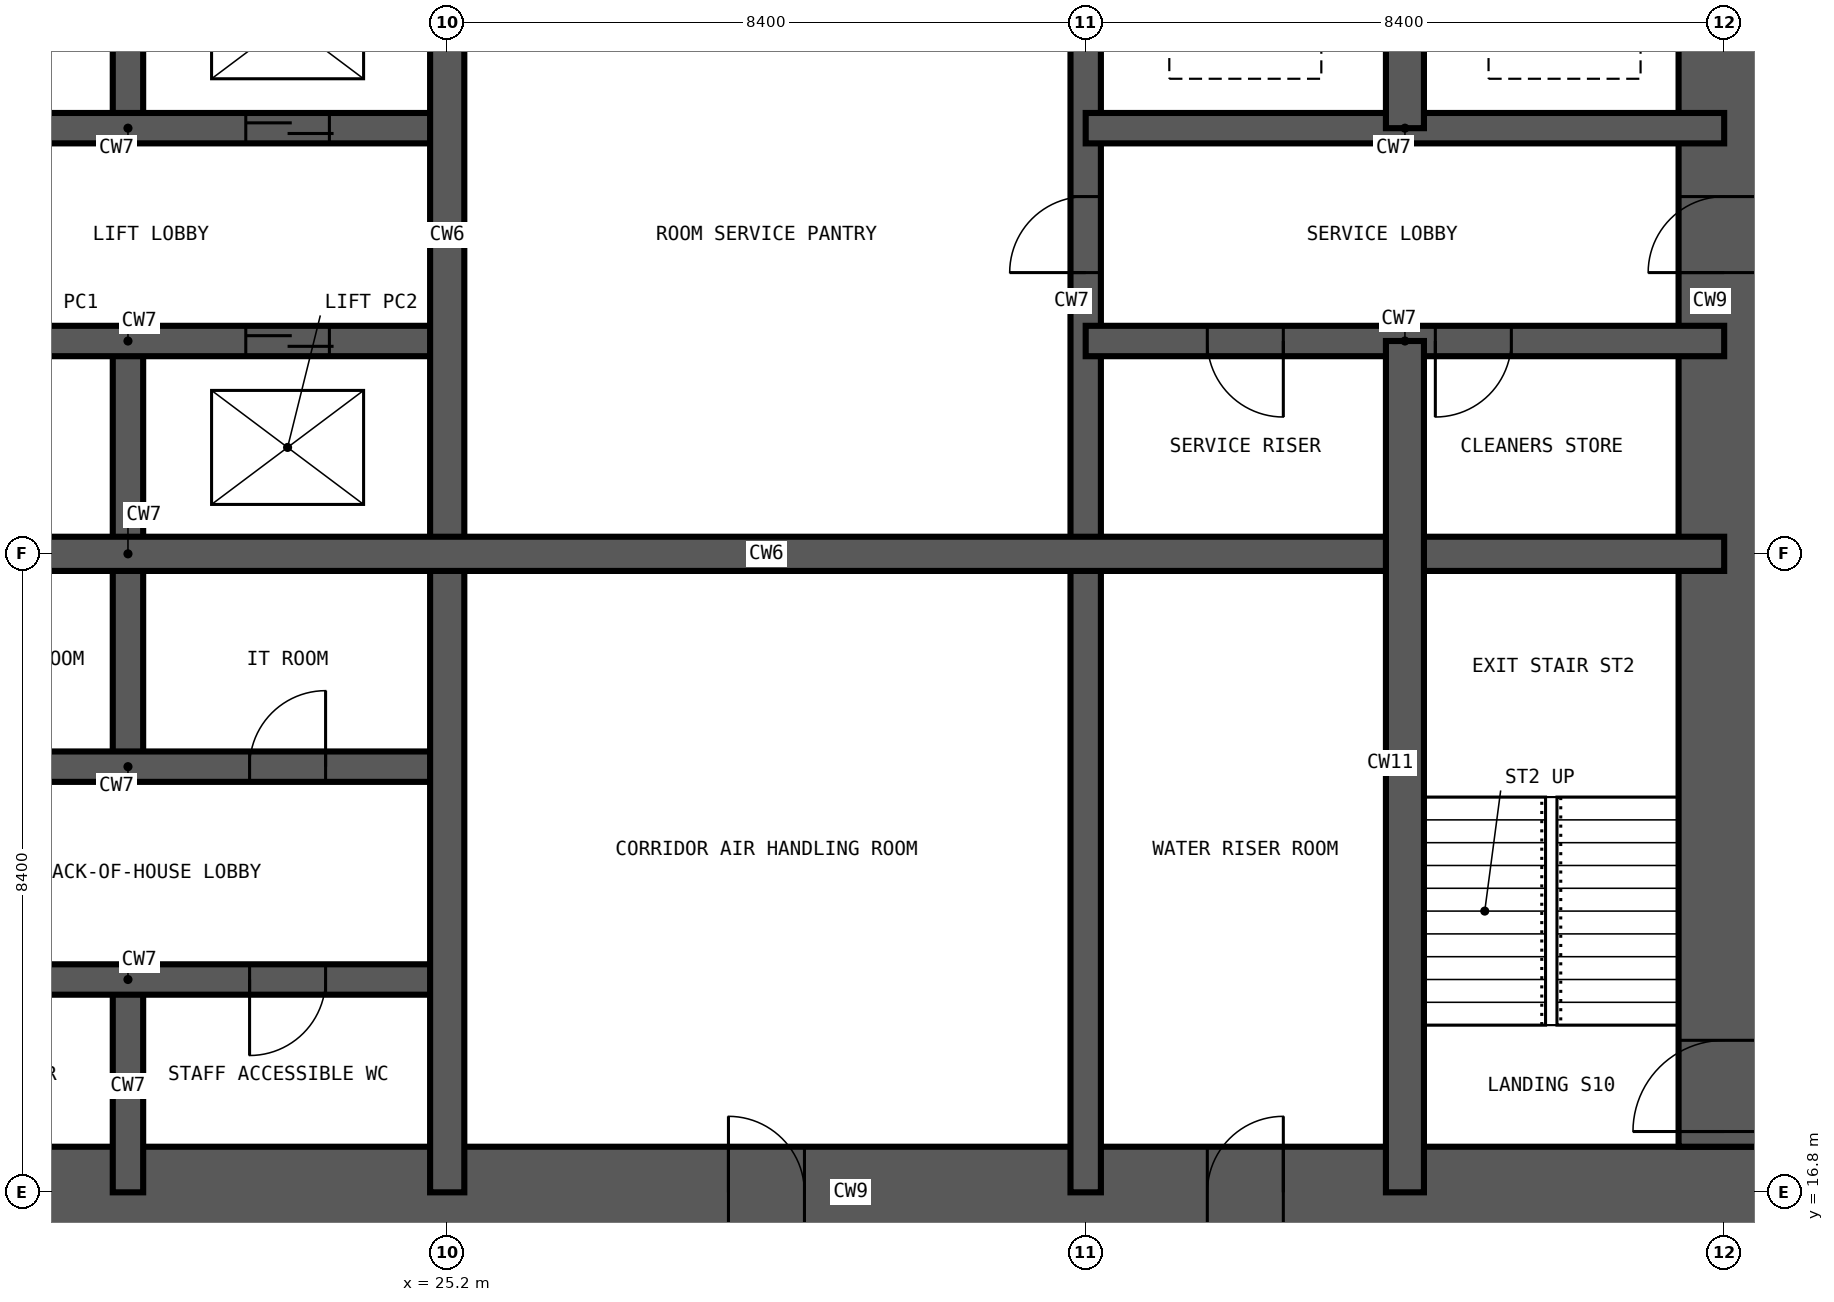
"""IFC4 building model, lengths in metres.
Left out: names, types, materials, properties, quantities, classifications, styles, units other than length and angle.
Written with IfcOpenShell. Run it as: python <this file> out.ifc"""

import sys

from ifc_helpers import new_model, si_unit, direction, frame, frame_2d, origin, place, context, subcontext, project, spatial, rectangle, extrude, element, fill, save


model = new_model("IFC4")
c1 = context("Model", 3, precision=1e-05, world=origin(), true_north=direction((0.0, 1.0)))
c2 = subcontext(c1, "Body", "Model", "MODEL_VIEW")
j1 = project(units=[si_unit("LENGTHUNIT", "METRE"), si_unit("PLANEANGLEUNIT", "RADIAN")], contexts=[c1])
p1 = place(None, origin())
s1 = spatial("IfcSite", under=j1, at=p1, CompositionType="ELEMENT")
p2 = place(p1, origin())
s2 = spatial("IfcBuilding", under=s1, at=p2, CompositionType="ELEMENT")
p3 = place(p2, frame((0.0, 0.0, 216.6)))
s3 = spatial("IfcBuildingStorey", under=s2, at=p3, CompositionType="ELEMENT", Elevation=216.6)
p4 = place(p3, frame((16.2, 16.8, -0.35), z_axis=(0.0, 0.0, 1.0), x_axis=(1.0, 0.0, 0.0)))
e1 = element("IfcWall", 1, at=p4, inside=s3, PredefinedType="SHEAR", context=c2, shape_type="SweptSolid", body=[
    extrude(rectangle(XDim=26.4, YDim=1.2, at=frame_2d((13.2, 0.0))), origin(), (0.0, 0.0, 1.0), 3.55),
])
p5 = place(p4, frame((12.7, 0.0, 0.35)))
e2 = element("IfcOpeningElement", 2, at=p5, cuts=e1, PredefinedType="OPENING", context=c2, shape_type="SweptSolid", body=[
    extrude(rectangle(XDim=1.0, YDim=2.1, at=frame_2d((0.5, 1.05))), frame((0.0, 0.61, 0.0), z_axis=(0.0, -1.0, 0.0), x_axis=(1.0, 0.0, 0.0)), (0.0, 0.0, 1.0), 1.22),
])
p6 = place(p4, frame((19.0, 0.0, 0.35)))
e3 = element("IfcOpeningElement", 3, at=p6, cuts=e1, PredefinedType="OPENING", context=c2, shape_type="SweptSolid", body=[
    extrude(rectangle(XDim=1.0, YDim=2.1, at=frame_2d((0.5, 1.05))), frame((0.0, 0.61, 0.0), z_axis=(0.0, -1.0, 0.0), x_axis=(1.0, 0.0, 0.0)), (0.0, 0.0, 1.0), 1.22),
])
p7 = place(p3, frame((42.0, 17.4, -0.35), z_axis=(0.0, 0.0, 1.0), x_axis=(0.0, 1.0, 0.0)))
e4 = element("IfcWall", 4, at=p7, inside=s3, PredefinedType="SHEAR", context=c2, shape_type="SweptSolid", body=[
    extrude(rectangle(XDim=24.0, YDim=1.2, at=frame_2d((12.0, 0.0))), origin(), (0.0, 0.0, 1.0), 3.55),
])
p8 = place(p7, frame((0.2, 0.0, 0.35)))
e5 = element("IfcOpeningElement", 5, at=p8, cuts=e4, PredefinedType="OPENING", context=c2, shape_type="SweptSolid", body=[
    extrude(rectangle(XDim=1.2, YDim=2.2, at=frame_2d((0.6, 1.1))), frame((0.0, 0.61, 0.0), z_axis=(0.0, -1.0, 0.0), x_axis=(1.0, 0.0, 0.0)), (0.0, 0.0, 1.0), 1.22),
])
p9 = place(p7, frame((11.5, 0.0, 0.35)))
e6 = element("IfcOpeningElement", 6, at=p9, cuts=e4, PredefinedType="OPENING", context=c2, shape_type="SweptSolid", body=[
    extrude(rectangle(XDim=1.0, YDim=2.1, at=frame_2d((0.5, 1.05))), frame((0.0, 0.61, 0.0), z_axis=(0.0, -1.0, 0.0), x_axis=(1.0, 0.0, 0.0)), (0.0, 0.0, 1.0), 1.22),
])
p10 = place(p7, frame((19.9, 0.0, 0.35)))
e7 = element("IfcOpeningElement", 7, at=p10, cuts=e4, PredefinedType="OPENING", context=c2, shape_type="SweptSolid", body=[
    extrude(rectangle(XDim=1.0, YDim=2.1, at=frame_2d((0.5, 1.05))), frame((0.0, 0.61, 0.0), z_axis=(0.0, -1.0, 0.0), x_axis=(1.0, 0.0, 0.0)), (0.0, 0.0, 1.0), 1.22),
])
p11 = place(p3, frame((21.0, 16.8, -0.35), z_axis=(0.0, 0.0, 1.0), x_axis=(0.0, 1.0, 0.0)))
e8 = element("IfcWall", 8, at=p11, inside=s3, PredefinedType="SHEAR", context=c2, shape_type="SweptSolid", body=[
    extrude(rectangle(XDim=2.8, YDim=0.4, at=frame_2d((1.4, 0.0))), origin(), (0.0, 0.0, 1.0), 3.55),
])
p12 = place(p3, frame((21.0, 22.4, -0.35), z_axis=(0.0, 0.0, 1.0), x_axis=(0.0, 1.0, 0.0)))
e9 = element("IfcWall", 9, at=p12, inside=s3, PredefinedType="SHEAR", context=c2, shape_type="SweptSolid", body=[
    extrude(rectangle(XDim=5.6, YDim=0.4, at=frame_2d((2.8, 0.0))), origin(), (0.0, 0.0, 1.0), 3.55),
])
p13 = place(p3, frame((21.0, 30.8, -0.35), z_axis=(0.0, 0.0, 1.0), x_axis=(0.0, 1.0, 0.0)))
e10 = element("IfcWall", 10, at=p13, inside=s3, PredefinedType="SHEAR", context=c2, shape_type="SweptSolid", body=[
    extrude(rectangle(XDim=2.8, YDim=0.4, at=frame_2d((1.4, 0.0))), origin(), (0.0, 0.0, 1.0), 3.55),
])
p14 = place(p3, frame((33.6, 16.8, -0.35), z_axis=(0.0, 0.0, 1.0), x_axis=(0.0, 1.0, 0.0)))
e11 = element("IfcWall", 11, at=p14, inside=s3, PredefinedType="SHEAR", context=c2, shape_type="SweptSolid", body=[
    extrude(rectangle(XDim=25.2, YDim=0.4, at=frame_2d((12.6, 0.0))), origin(), (0.0, 0.0, 1.0), 3.55),
])
p15 = place(p14, frame((22.5, 0.0, 0.35)))
e12 = element("IfcOpeningElement", 12, at=p15, cuts=e11, PredefinedType="OPENING", context=c2, shape_type="SweptSolid", body=[
    extrude(rectangle(XDim=1.2, YDim=2.2, at=frame_2d((0.6, 1.1))), frame((0.0, 0.21, 0.0), z_axis=(0.0, -1.0, 0.0), x_axis=(1.0, 0.0, 0.0)), (0.0, 0.0, 1.0), 0.42),
])
p16 = place(p14, frame((18.3, 0.0, 0.35)))
e13 = element("IfcOpeningElement", 13, at=p16, cuts=e11, PredefinedType="OPENING", context=c2, shape_type="SweptSolid", body=[
    extrude(rectangle(XDim=1.2, YDim=2.2, at=frame_2d((0.6, 1.1))), frame((0.0, 0.21, 0.0), z_axis=(0.0, -1.0, 0.0), x_axis=(1.0, 0.0, 0.0)), (0.0, 0.0, 1.0), 0.42),
])
p17 = place(p14, frame((12.1, 0.0, 0.35)))
e14 = element("IfcOpeningElement", 14, at=p17, cuts=e11, PredefinedType="OPENING", context=c2, shape_type="SweptSolid", body=[
    extrude(rectangle(XDim=1.0, YDim=2.1, at=frame_2d((0.5, 1.05))), frame((0.0, 0.21, 0.0), z_axis=(0.0, -1.0, 0.0), x_axis=(1.0, 0.0, 0.0)), (0.0, 0.0, 1.0), 0.42),
])
p18 = place(p3, frame((16.8, 19.6, -0.35), z_axis=(0.0, 0.0, 1.0), x_axis=(1.0, 0.0, 0.0)))
e15 = element("IfcWall", 15, at=p18, inside=s3, PredefinedType="SHEAR", context=c2, shape_type="SweptSolid", body=[
    extrude(rectangle(XDim=8.4, YDim=0.4, at=frame_2d((4.2, 0.0))), origin(), (0.0, 0.0, 1.0), 3.55),
])
p19 = place(p18, frame((1.6, 0.0, 0.35)))
e16 = element("IfcOpeningElement", 16, at=p19, cuts=e15, PredefinedType="OPENING", context=c2, shape_type="SweptSolid", body=[
    extrude(rectangle(XDim=1.0, YDim=2.1, at=frame_2d((0.5, 1.05))), frame((0.0, 0.21, 0.0), z_axis=(0.0, -1.0, 0.0), x_axis=(1.0, 0.0, 0.0)), (0.0, 0.0, 1.0), 0.42),
])
p20 = place(p18, frame((5.8, 0.0, 0.35)))
e17 = element("IfcOpeningElement", 17, at=p20, cuts=e15, PredefinedType="OPENING", context=c2, shape_type="SweptSolid", body=[
    extrude(rectangle(XDim=1.0, YDim=2.1, at=frame_2d((0.5, 1.05))), frame((0.0, 0.21, 0.0), z_axis=(0.0, -1.0, 0.0), x_axis=(1.0, 0.0, 0.0)), (0.0, 0.0, 1.0), 0.42),
])
p21 = place(p3, frame((16.8, 22.4, -0.35), z_axis=(0.0, 0.0, 1.0), x_axis=(1.0, 0.0, 0.0)))
e18 = element("IfcWall", 18, at=p21, inside=s3, PredefinedType="SHEAR", context=c2, shape_type="SweptSolid", body=[
    extrude(rectangle(XDim=8.4, YDim=0.4, at=frame_2d((4.2, 0.0))), origin(), (0.0, 0.0, 1.0), 3.55),
])
p22 = place(p21, frame((1.6, 0.0, 0.35)))
e19 = element("IfcOpeningElement", 19, at=p22, cuts=e18, PredefinedType="OPENING", context=c2, shape_type="SweptSolid", body=[
    extrude(rectangle(XDim=1.0, YDim=2.1, at=frame_2d((0.5, 1.05))), frame((0.0, 0.21, 0.0), z_axis=(0.0, -1.0, 0.0), x_axis=(1.0, 0.0, 0.0)), (0.0, 0.0, 1.0), 0.42),
])
p23 = place(p21, frame((5.8, 0.0, 0.35)))
e20 = element("IfcOpeningElement", 20, at=p23, cuts=e18, PredefinedType="OPENING", context=c2, shape_type="SweptSolid", body=[
    extrude(rectangle(XDim=1.0, YDim=2.1, at=frame_2d((0.5, 1.05))), frame((0.0, 0.21, 0.0), z_axis=(0.0, -1.0, 0.0), x_axis=(1.0, 0.0, 0.0)), (0.0, 0.0, 1.0), 0.42),
])
p24 = place(p3, frame((16.8, 28.0, -0.35), z_axis=(0.0, 0.0, 1.0), x_axis=(1.0, 0.0, 0.0)))
e21 = element("IfcWall", 21, at=p24, inside=s3, PredefinedType="SHEAR", context=c2, shape_type="SweptSolid", body=[
    extrude(rectangle(XDim=8.4, YDim=0.4, at=frame_2d((4.2, 0.0))), origin(), (0.0, 0.0, 1.0), 3.55),
])
p25 = place(p24, frame((1.55, 0.0, 0.35)))
e22 = element("IfcOpeningElement", 22, at=p25, cuts=e21, PredefinedType="OPENING", context=c2, shape_type="SweptSolid", body=[
    extrude(rectangle(XDim=1.1, YDim=2.2, at=frame_2d((0.55, 1.1))), frame((0.0, 0.21, 0.0), z_axis=(0.0, -1.0, 0.0), x_axis=(1.0, 0.0, 0.0)), (0.0, 0.0, 1.0), 0.42),
])
p26 = place(p24, frame((5.75, 0.0, 0.35)))
e23 = element("IfcOpeningElement", 23, at=p26, cuts=e21, PredefinedType="OPENING", context=c2, shape_type="SweptSolid", body=[
    extrude(rectangle(XDim=1.1, YDim=2.2, at=frame_2d((0.55, 1.1))), frame((0.0, 0.21, 0.0), z_axis=(0.0, -1.0, 0.0), x_axis=(1.0, 0.0, 0.0)), (0.0, 0.0, 1.0), 0.42),
])
p27 = place(p3, frame((33.6, 28.0, -0.35), z_axis=(0.0, 0.0, 1.0), x_axis=(1.0, 0.0, 0.0)))
e24 = element("IfcWall", 24, at=p27, inside=s3, PredefinedType="SHEAR", context=c2, shape_type="SweptSolid", body=[
    extrude(rectangle(XDim=8.4, YDim=0.4, at=frame_2d((4.2, 0.0))), origin(), (0.0, 0.0, 1.0), 3.55),
])
p28 = place(p27, frame((1.6, 0.0, 0.35)))
e25 = element("IfcOpeningElement", 25, at=p28, cuts=e24, PredefinedType="OPENING", context=c2, shape_type="SweptSolid", body=[
    extrude(rectangle(XDim=1.0, YDim=2.1, at=frame_2d((0.5, 1.05))), frame((0.0, 0.21, 0.0), z_axis=(0.0, -1.0, 0.0), x_axis=(1.0, 0.0, 0.0)), (0.0, 0.0, 1.0), 0.42),
])
p29 = place(p27, frame((4.6, 0.0, 0.35)))
e26 = element("IfcOpeningElement", 26, at=p29, cuts=e24, PredefinedType="OPENING", context=c2, shape_type="SweptSolid", body=[
    extrude(rectangle(XDim=1.0, YDim=2.1, at=frame_2d((0.5, 1.05))), frame((0.0, 0.21, 0.0), z_axis=(0.0, -1.0, 0.0), x_axis=(1.0, 0.0, 0.0)), (0.0, 0.0, 1.0), 0.42),
])
p30 = place(p3, frame((16.8, 30.8, -0.35), z_axis=(0.0, 0.0, 1.0), x_axis=(1.0, 0.0, 0.0)))
e27 = element("IfcWall", 27, at=p30, inside=s3, PredefinedType="SHEAR", context=c2, shape_type="SweptSolid", body=[
    extrude(rectangle(XDim=8.4, YDim=0.4, at=frame_2d((4.2, 0.0))), origin(), (0.0, 0.0, 1.0), 3.55),
])
p31 = place(p30, frame((1.55, 0.0, 0.35)))
e28 = element("IfcOpeningElement", 28, at=p31, cuts=e27, PredefinedType="OPENING", context=c2, shape_type="SweptSolid", body=[
    extrude(rectangle(XDim=1.1, YDim=2.2, at=frame_2d((0.55, 1.1))), frame((0.0, 0.21, 0.0), z_axis=(0.0, -1.0, 0.0), x_axis=(1.0, 0.0, 0.0)), (0.0, 0.0, 1.0), 0.42),
])
p32 = place(p30, frame((5.75, 0.0, 0.35)))
e29 = element("IfcOpeningElement", 29, at=p32, cuts=e27, PredefinedType="OPENING", context=c2, shape_type="SweptSolid", body=[
    extrude(rectangle(XDim=1.1, YDim=2.2, at=frame_2d((0.55, 1.1))), frame((0.0, 0.21, 0.0), z_axis=(0.0, -1.0, 0.0), x_axis=(1.0, 0.0, 0.0)), (0.0, 0.0, 1.0), 0.42),
])
p33 = place(p3, frame((33.6, 30.8, -0.35), z_axis=(0.0, 0.0, 1.0), x_axis=(1.0, 0.0, 0.0)))
e30 = element("IfcWall", 30, at=p33, inside=s3, PredefinedType="SHEAR", context=c2, shape_type="SweptSolid", body=[
    extrude(rectangle(XDim=8.4, YDim=0.4, at=frame_2d((4.2, 0.0))), origin(), (0.0, 0.0, 1.0), 3.55),
])
for number, where, z_axis, x_axis in (
    (31, (25.2, 16.8, -0.35), (0.0, 0.0, 1.0), (0.0, 1.0, 0.0)),
    (32, (16.8, 25.2, -0.35), (0.0, 0.0, 1.0), (1.0, 0.0, 0.0)),
):
    element("IfcWall", number, at=place(p3, frame(where, z_axis=z_axis, x_axis=x_axis)), inside=s3, PredefinedType="SHEAR", context=c2, shape_type="SweptSolid", body=[
        extrude(rectangle(XDim=25.2, YDim=0.45, at=frame_2d((12.6, 0.0))), origin(), (0.0, 0.0, 1.0), 3.55),
    ])
p34 = place(p3, frame((37.8, 16.8, -0.35), z_axis=(0.0, 0.0, 1.0), x_axis=(0.0, 1.0, 0.0)))
e33 = element("IfcWall", 33, at=p34, inside=s3, PredefinedType="SHEAR", context=c2, shape_type="SweptSolid", body=[
    extrude(rectangle(XDim=11.2, YDim=0.5, at=frame_2d((5.6, 0.0))), origin(), (0.0, 0.0, 1.0), 3.55),
])
p35 = place(p3, frame((37.8, 30.8, -0.35), z_axis=(0.0, 0.0, 1.0), x_axis=(0.0, 1.0, 0.0)))
e34 = element("IfcWall", 34, at=p35, inside=s3, PredefinedType="SHEAR", context=c2, shape_type="SweptSolid", body=[
    extrude(rectangle(XDim=2.8, YDim=0.5, at=frame_2d((1.4, 0.0))), origin(), (0.0, 0.0, 1.0), 3.55),
])
p36 = place(p8, origin())
e35 = element("IfcDoor", 35, at=p36, inside=s3, OperationType="SINGLE_SWING_LEFT", PredefinedType="DOOR", context=c2, shape_type="SweptSolid", body=[
    extrude(rectangle(XDim=1.2, YDim=2.2, at=frame_2d((0.6, 1.1))), frame((0.0, 0.025, 0.0), z_axis=(0.0, -1.0, 0.0), x_axis=(1.0, 0.0, 0.0)), (0.0, 0.0, 1.0), 0.05),
])
fill(e5, e35)
p37 = place(p26, origin())
e36 = element("IfcDoor", 36, at=p37, inside=s3, OperationType="DOUBLE_DOOR_SLIDING", PredefinedType="DOOR", context=c2, shape_type="SweptSolid", body=[
    extrude(rectangle(XDim=1.1, YDim=2.2, at=frame_2d((0.55, 1.1))), frame((0.0, 0.025, 0.0), z_axis=(0.0, -1.0, 0.0), x_axis=(1.0, 0.0, 0.0)), (0.0, 0.0, 1.0), 0.05),
])
fill(e23, e36)
p38 = place(p32, origin())
e37 = element("IfcDoor", 37, at=p38, inside=s3, OperationType="DOUBLE_DOOR_SLIDING", PredefinedType="DOOR", context=c2, shape_type="SweptSolid", body=[
    extrude(rectangle(XDim=1.1, YDim=2.2, at=frame_2d((0.55, 1.1))), frame((0.0, 0.025, 0.0), z_axis=(0.0, -1.0, 0.0), x_axis=(1.0, 0.0, 0.0)), (0.0, 0.0, 1.0), 0.05),
])
fill(e29, e37)
p39 = place(p20, frame((1.0, 0.0, 0.0), z_axis=(0.0, 0.0, 1.0), x_axis=(-1.0, 0.0, 0.0)))
e38 = element("IfcDoor", 38, at=p39, inside=s3, OperationType="SINGLE_SWING_RIGHT", PredefinedType="DOOR", context=c2, shape_type="SweptSolid", body=[
    extrude(rectangle(XDim=1.0, YDim=2.1, at=frame_2d((0.5, 1.05))), frame((0.0, 0.025, 0.0), z_axis=(0.0, -1.0, 0.0), x_axis=(1.0, 0.0, 0.0)), (0.0, 0.0, 1.0), 0.05),
])
fill(e17, e38)
p40 = place(p23, origin())
e39 = element("IfcDoor", 39, at=p40, inside=s3, OperationType="SINGLE_SWING_RIGHT", PredefinedType="DOOR", context=c2, shape_type="SweptSolid", body=[
    extrude(rectangle(XDim=1.0, YDim=2.1, at=frame_2d((0.5, 1.05))), frame((0.0, 0.025, 0.0), z_axis=(0.0, -1.0, 0.0), x_axis=(1.0, 0.0, 0.0)), (0.0, 0.0, 1.0), 0.05),
])
fill(e20, e39)
p41 = place(p17, origin())
e40 = element("IfcDoor", 40, at=p41, inside=s3, OperationType="SINGLE_SWING_LEFT", PredefinedType="DOOR", context=c2, shape_type="SweptSolid", body=[
    extrude(rectangle(XDim=1.0, YDim=2.1, at=frame_2d((0.5, 1.05))), frame((0.0, 0.025, 0.0), z_axis=(0.0, -1.0, 0.0), x_axis=(1.0, 0.0, 0.0)), (0.0, 0.0, 1.0), 0.05),
])
fill(e14, e40)
p42 = place(p28, frame((1.0, 0.0, 0.0), z_axis=(0.0, 0.0, 1.0), x_axis=(-1.0, 0.0, 0.0)))
e41 = element("IfcDoor", 41, at=p42, inside=s3, OperationType="SINGLE_SWING_LEFT", PredefinedType="DOOR", context=c2, shape_type="SweptSolid", body=[
    extrude(rectangle(XDim=1.0, YDim=2.1, at=frame_2d((0.5, 1.05))), frame((0.0, 0.025, 0.0), z_axis=(0.0, -1.0, 0.0), x_axis=(1.0, 0.0, 0.0)), (0.0, 0.0, 1.0), 0.05),
])
fill(e25, e41)
p43 = place(p29, frame((1.0, 0.0, 0.0), z_axis=(0.0, 0.0, 1.0), x_axis=(-1.0, 0.0, 0.0)))
e42 = element("IfcDoor", 42, at=p43, inside=s3, OperationType="SINGLE_SWING_RIGHT", PredefinedType="DOOR", context=c2, shape_type="SweptSolid", body=[
    extrude(rectangle(XDim=1.0, YDim=2.1, at=frame_2d((0.5, 1.05))), frame((0.0, 0.025, 0.0), z_axis=(0.0, -1.0, 0.0), x_axis=(1.0, 0.0, 0.0)), (0.0, 0.0, 1.0), 0.05),
])
fill(e26, e42)
p44 = place(p9, origin())
e43 = element("IfcDoor", 43, at=p44, inside=s3, OperationType="SINGLE_SWING_LEFT", PredefinedType="DOOR", context=c2, shape_type="SweptSolid", body=[
    extrude(rectangle(XDim=1.0, YDim=2.1, at=frame_2d((0.5, 1.05))), frame((0.0, 0.025, 0.0), z_axis=(0.0, -1.0, 0.0), x_axis=(1.0, 0.0, 0.0)), (0.0, 0.0, 1.0), 0.05),
])
fill(e6, e43)
p45 = place(p5, origin())
e44 = element("IfcDoor", 44, at=p45, inside=s3, OperationType="SINGLE_SWING_LEFT", PredefinedType="DOOR", context=c2, shape_type="SweptSolid", body=[
    extrude(rectangle(XDim=1.0, YDim=2.1, at=frame_2d((0.5, 1.05))), frame((0.0, 0.025, 0.0), z_axis=(0.0, -1.0, 0.0), x_axis=(1.0, 0.0, 0.0)), (0.0, 0.0, 1.0), 0.05),
])
fill(e2, e44)
p46 = place(p6, origin())
e45 = element("IfcDoor", 45, at=p46, inside=s3, OperationType="SINGLE_SWING_RIGHT", PredefinedType="DOOR", context=c2, shape_type="SweptSolid", body=[
    extrude(rectangle(XDim=1.0, YDim=2.1, at=frame_2d((0.5, 1.05))), frame((0.0, 0.025, 0.0), z_axis=(0.0, -1.0, 0.0), x_axis=(1.0, 0.0, 0.0)), (0.0, 0.0, 1.0), 0.05),
])
fill(e3, e45)
save(model, sys.argv[1])
